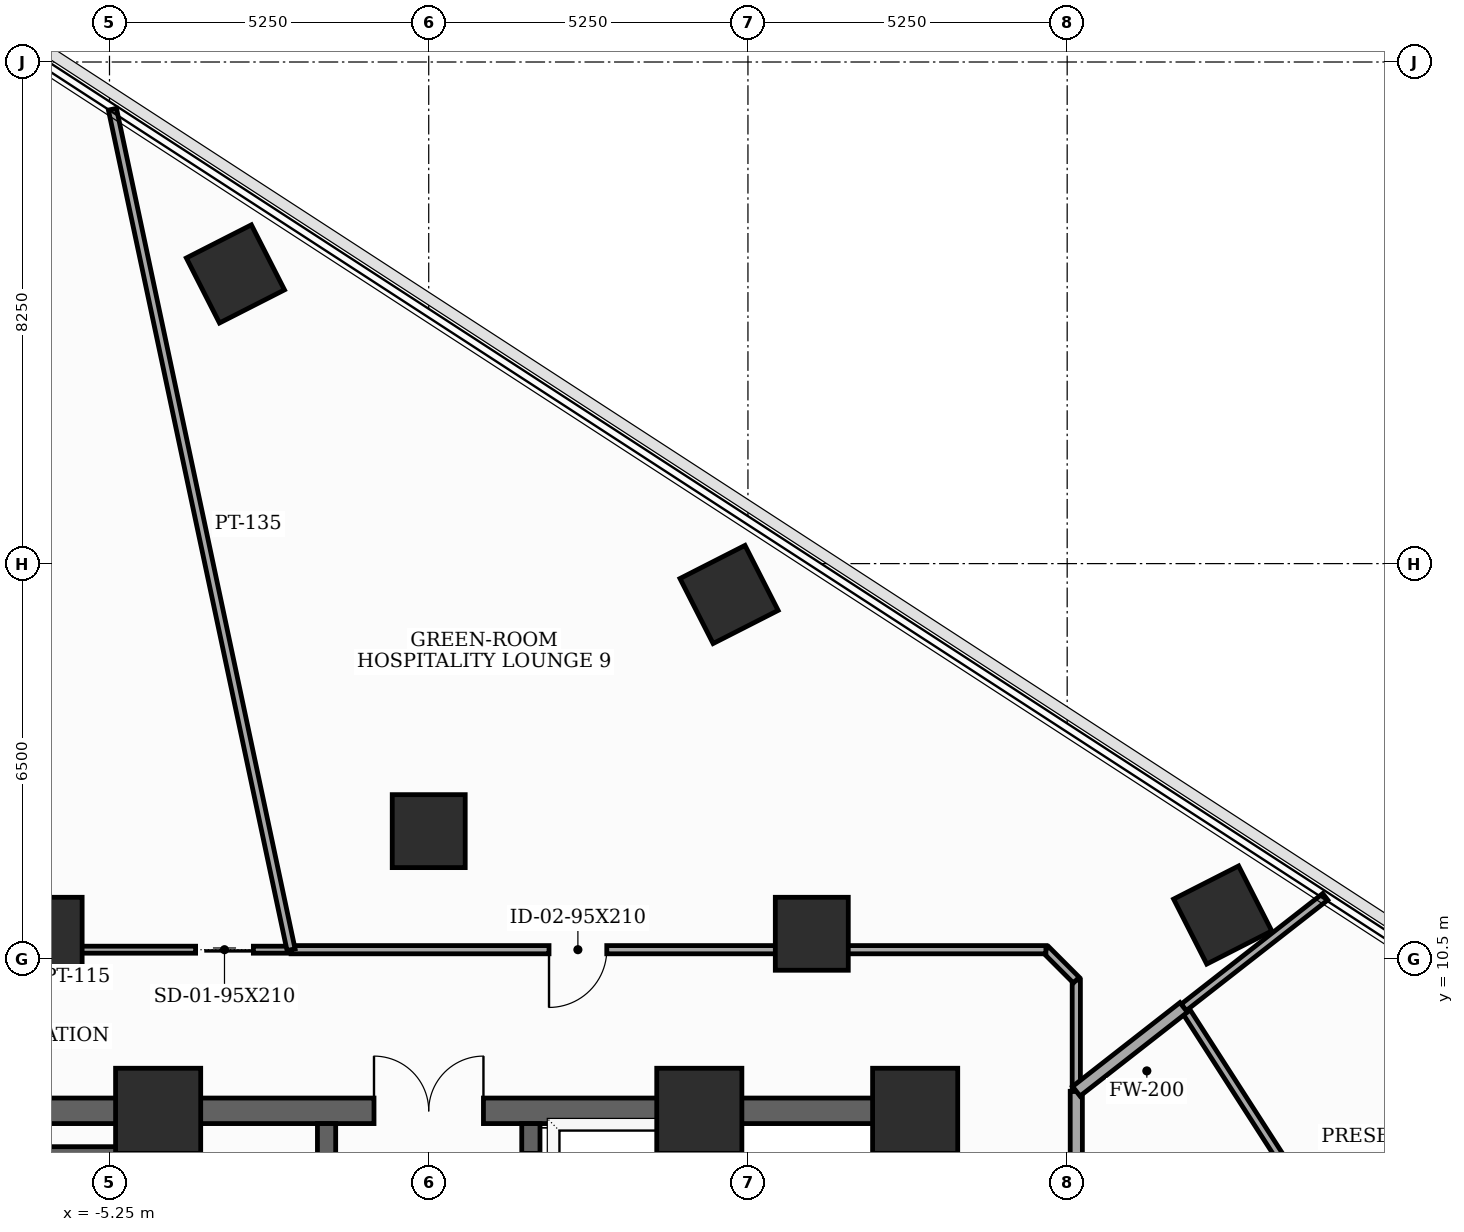
"""IFC4 building model, lengths in metres.
Left out: names, types, materials, properties, quantities, classifications, styles, units other than length and angle.
Written with IfcOpenShell. Run it as: python <this file> out.ifc"""

import sys

from ifc_helpers import new_model, si_unit, direction, frame, frame_2d, origin, origin_2d, place, context, subcontext, project, spatial, rectangle, extrude, element, fill, save


model = new_model("IFC4")
c1 = context("Model", 3, precision=1e-05, world=origin(), true_north=direction((0.0, 1.0)))
c2 = subcontext(c1, "Body", "Model", "MODEL_VIEW")
j1 = project(units=[si_unit("LENGTHUNIT", "METRE"), si_unit("PLANEANGLEUNIT", "RADIAN")], contexts=[c1])
p1 = place(None, origin())
s1 = spatial("IfcSite", under=j1, at=p1, CompositionType="ELEMENT")
p2 = place(p1, origin())
s2 = spatial("IfcBuilding", under=s1, at=p2, CompositionType="ELEMENT")
p3 = place(p2, frame((0.0, 0.0, 119.9)))
s3 = spatial("IfcBuildingStorey", under=s2, at=p3, CompositionType="ELEMENT", Elevation=119.9)
for number, where, z_axis, x_axis in (
    (1, (8.0, 8.0, 0.0), (0.0, 0.0, 1.0), (1.0, 0.0, 0.0)),
    (2, (4.45, 8.0, 0.0), (0.0, 0.0, 1.0), (1.0, 0.0, 0.0)),
    (3, (-4.45, 8.0, 0.0), (0.0, 0.0, 1.0), (1.0, 0.0, 0.0)),
):
    element("IfcColumn", number, at=place(p3, frame(where, z_axis=z_axis, x_axis=x_axis)), inside=s3, PredefinedType="COLUMN", context=c2, shape_type="SweptSolid", body=[
        extrude(rectangle(XDim=1.4, YDim=1.4, at=origin_2d()), origin(), (0.0, 0.0, 1.0), 3.7),
    ])
for number, where, z_axis, x_axis in (
    (4, (6.3, 10.912, 0.0), (0.0, 0.0, 1.0), (1.0, 0.0, 0.0)),
    (5, (0.0, 12.6, 0.0), (0.0, 0.0, 1.0), (1.0, 0.0, 0.0)),
    (6, (-6.3, 10.912, 0.0), (0.0, 0.0, 1.0), (1.0, 0.0, 0.0)),
    (7, (13.058, 11.22, 0.0), (0.0, 0.0, 1.0), (0.891, 0.454, 0.0)),
    (8, (4.939, 16.492, 0.0), (0.0, 0.0, 1.0), (0.891, 0.454, 0.0)),
    (9, (-3.179, 21.765, 0.0), (0.0, 0.0, 1.0), (0.891, 0.454, 0.0)),
):
    element("IfcColumn", number, at=place(p3, frame(where, z_axis=z_axis, x_axis=x_axis)), inside=s3, PredefinedType="COLUMN", context=c2, shape_type="SweptSolid", body=[
        extrude(rectangle(XDim=1.2, YDim=1.2, at=origin_2d()), origin(), (0.0, 0.0, 1.0), 3.7),
    ])
p4 = place(p3, frame((8.0, -8.0, 0.0), z_axis=(0.0, 0.0, 1.0), x_axis=(0.0, 1.0, 0.0)))
e10 = element("IfcWall", 10, at=p4, inside=s3, PredefinedType="SHEAR", context=c2, shape_type="SweptSolid", body=[
    extrude(rectangle(XDim=16.0, YDim=0.42, at=frame_2d((8.0, 0.0))), origin(), (0.0, 0.0, 1.0), 3.5),
])
p5 = place(p4, frame((9.6, 0.0, 0.0)))
e11 = element("IfcOpeningElement", 11, at=p5, cuts=e10, PredefinedType="OPENING", context=c2, shape_type="SweptSolid", body=[
    extrude(rectangle(XDim=1.05, YDim=2.15, at=frame_2d((0.525, 1.075))), frame((0.0, 0.22, 0.0), z_axis=(0.0, -1.0, 0.0), x_axis=(1.0, 0.0, 0.0)), (0.0, 0.0, 1.0), 0.44),
])
p6 = place(p4, frame((14.229, 0.0, 0.0)))
e12 = element("IfcOpeningElement", 12, at=p6, cuts=e10, PredefinedType="OPENING", context=c2, shape_type="SweptSolid", body=[
    extrude(rectangle(XDim=0.85, YDim=2.02, at=frame_2d((0.425, 1.01))), frame((0.0, 0.22, 0.0), z_axis=(0.0, -1.0, 0.0), x_axis=(1.0, 0.0, 0.0)), (0.0, 0.0, 1.0), 0.44),
])
p7 = place(p3, frame((-8.0, 8.0, 0.0), z_axis=(0.0, 0.0, 1.0), x_axis=(1.0, 0.0, 0.0)))
e13 = element("IfcWall", 13, at=p7, inside=s3, PredefinedType="SHEAR", context=c2, shape_type="SweptSolid", body=[
    extrude(rectangle(XDim=16.0, YDim=0.42, at=frame_2d((8.0, 0.0))), origin(), (0.0, 0.0, 1.0), 3.5),
])
p8 = place(p7, frame((7.1, 0.0, 0.0)))
e14 = element("IfcOpeningElement", 14, at=p8, cuts=e13, PredefinedType="OPENING", context=c2, shape_type="SweptSolid", body=[
    extrude(rectangle(XDim=1.8, YDim=2.15, at=frame_2d((0.9, 1.075))), frame((0.0, 0.22, 0.0), z_axis=(0.0, -1.0, 0.0), x_axis=(1.0, 0.0, 0.0)), (0.0, 0.0, 1.0), 0.44),
])
for number, where, z_axis, x_axis in (
    (15, (-4.45, -7.79, 0.0), (0.0, 0.0, 1.0), (0.0, 1.0, 0.0)),
    (16, (4.45, -7.79, 0.0), (0.0, 0.0, 1.0), (0.0, 1.0, 0.0)),
):
    element("IfcWall", number, at=place(p3, frame(where, z_axis=z_axis, x_axis=x_axis)), inside=s3, PredefinedType="SHEAR", context=c2, shape_type="SweptSolid", body=[
        extrude(rectangle(XDim=15.58, YDim=0.3, at=frame_2d((7.79, 0.0))), origin(), (0.0, 0.0, 1.0), 3.5),
    ])
p9 = place(p3, frame((-7.79, 7.26, 0.0), z_axis=(0.0, 0.0, 1.0), x_axis=(1.0, 0.0, 0.0)))
e17 = element("IfcWall", 17, at=p9, inside=s3, PredefinedType="SHEAR", context=c2, shape_type="SweptSolid", body=[
    extrude(rectangle(XDim=3.34, YDim=0.3, at=frame_2d((1.67, 0.0))), origin(), (0.0, 0.0, 1.0), 3.5),
])
p10 = place(p3, frame((-1.68, -4.85, 0.0), z_axis=(0.0, 0.0, 1.0), x_axis=(0.0, 1.0, 0.0)))
e18 = element("IfcWall", 18, at=p10, inside=s3, PredefinedType="SHEAR", context=c2, shape_type="SweptSolid", body=[
    extrude(rectangle(XDim=12.64, YDim=0.3, at=frame_2d((6.32, 0.0))), origin(), (0.0, 0.0, 1.0), 3.5),
])
p11 = place(p10, frame((5.5, 0.0, 0.0)))
e19 = element("IfcOpeningElement", 19, at=p11, cuts=e18, PredefinedType="OPENING", context=c2, shape_type="SweptSolid", body=[
    extrude(rectangle(XDim=0.95, YDim=2.1, at=frame_2d((0.475, 1.05))), frame((0.0, 0.16, 0.0), z_axis=(0.0, -1.0, 0.0), x_axis=(1.0, 0.0, 0.0)), (0.0, 0.0, 1.0), 0.32),
])
p12 = place(p3, frame((1.68, -4.85, 0.0), z_axis=(0.0, 0.0, 1.0), x_axis=(0.0, 1.0, 0.0)))
e20 = element("IfcWall", 20, at=p12, inside=s3, PredefinedType="SHEAR", context=c2, shape_type="SweptSolid", body=[
    extrude(rectangle(XDim=12.64, YDim=0.3, at=frame_2d((6.32, 0.0))), origin(), (0.0, 0.0, 1.0), 3.5),
])
p13 = place(p12, frame((0.55, 0.0, 0.0)))
e21 = element("IfcOpeningElement", 21, at=p13, cuts=e20, PredefinedType="OPENING", context=c2, shape_type="SweptSolid", body=[
    extrude(rectangle(XDim=1.1, YDim=2.1, at=frame_2d((0.55, 1.05))), frame((0.0, 0.16, 0.0), z_axis=(0.0, -1.0, 0.0), x_axis=(1.0, 0.0, 0.0)), (0.0, 0.0, 1.0), 0.32),
])
p14 = place(p12, frame((2.65, 0.0, 0.0)))
e22 = element("IfcOpeningElement", 22, at=p14, cuts=e20, PredefinedType="OPENING", context=c2, shape_type="SweptSolid", body=[
    extrude(rectangle(XDim=1.1, YDim=2.1, at=frame_2d((0.55, 1.05))), frame((0.0, 0.16, 0.0), z_axis=(0.0, -1.0, 0.0), x_axis=(1.0, 0.0, 0.0)), (0.0, 0.0, 1.0), 0.32),
])
p15 = place(p12, frame((4.75, 0.0, 0.0)))
e23 = element("IfcOpeningElement", 23, at=p15, cuts=e20, PredefinedType="OPENING", context=c2, shape_type="SweptSolid", body=[
    extrude(rectangle(XDim=1.1, YDim=2.1, at=frame_2d((0.55, 1.05))), frame((0.0, 0.16, 0.0), z_axis=(0.0, -1.0, 0.0), x_axis=(1.0, 0.0, 0.0)), (0.0, 0.0, 1.0), 0.32),
])
p16 = place(p12, frame((6.85, 0.0, 0.0)))
e24 = element("IfcOpeningElement", 24, at=p16, cuts=e20, PredefinedType="OPENING", context=c2, shape_type="SweptSolid", body=[
    extrude(rectangle(XDim=1.1, YDim=2.1, at=frame_2d((0.55, 1.05))), frame((0.0, 0.16, 0.0), z_axis=(0.0, -1.0, 0.0), x_axis=(1.0, 0.0, 0.0)), (0.0, 0.0, 1.0), 0.32),
])
p17 = place(p12, frame((8.95, 0.0, 0.0)))
e25 = element("IfcOpeningElement", 25, at=p17, cuts=e20, PredefinedType="OPENING", context=c2, shape_type="SweptSolid", body=[
    extrude(rectangle(XDim=1.1, YDim=2.1, at=frame_2d((0.55, 1.05))), frame((0.0, 0.16, 0.0), z_axis=(0.0, -1.0, 0.0), x_axis=(1.0, 0.0, 0.0)), (0.0, 0.0, 1.0), 0.32),
])
p18 = place(p12, frame((11.05, 0.0, 0.0)))
e26 = element("IfcOpeningElement", 26, at=p18, cuts=e20, PredefinedType="OPENING", context=c2, shape_type="SweptSolid", body=[
    extrude(rectangle(XDim=1.1, YDim=2.1, at=frame_2d((0.55, 1.05))), frame((0.0, 0.16, 0.0), z_axis=(0.0, -1.0, 0.0), x_axis=(1.0, 0.0, 0.0)), (0.0, 0.0, 1.0), 0.32),
])
p19 = place(p3, frame((10.65, 2.655, 0.0), z_axis=(0.0, 0.0, 1.0), x_axis=(0.0, 1.0, 0.0)))
e27 = element("IfcWall", 27, at=p19, inside=s3, PredefinedType="SOLIDWALL", context=c2, shape_type="SweptSolid", body=[
    extrude(rectangle(XDim=5.666, YDim=0.2, at=frame_2d((2.833, 0.0))), origin(), (0.0, 0.0, 1.0), 2.785),
])
p20 = place(p19, frame((0.673, 0.0, 0.0)))
e28 = element("IfcOpeningElement", 28, at=p20, cuts=e27, PredefinedType="OPENING", context=c2, shape_type="SweptSolid", body=[
    extrude(rectangle(XDim=0.92, YDim=2.1, at=frame_2d((0.46, 1.05))), frame((0.0, 0.11, 0.0), z_axis=(0.0, -1.0, 0.0), x_axis=(1.0, 0.0, 0.0)), (0.0, 0.0, 1.0), 0.22),
])
p21 = place(p3, frame((10.65, 8.321, 0.0), z_axis=(0.0, 0.0, 1.0), x_axis=(0.0, 1.0, 0.0)))
e29 = element("IfcWall", 29, at=p21, inside=s3, PredefinedType="PARTITIONING", context=c2, shape_type="SweptSolid", body=[
    extrude(rectangle(XDim=1.829, YDim=0.135, at=frame_2d((0.915, 0.0))), origin(), (0.0, 0.0, 1.0), 3.125),
])
p22 = place(p3, frame((10.65, 10.15, 0.0), z_axis=(0.0, 0.0, 1.0), x_axis=(-0.707106781187, 0.707106781187, 0.0)))
e30 = element("IfcWall", 30, at=p22, inside=s3, PredefinedType="PARTITIONING", context=c2, shape_type="SweptSolid", body=[
    extrude(rectangle(XDim=0.707, YDim=0.135, at=frame_2d((0.354, 0.0))), origin(), (0.0, 0.0, 1.0), 3.125),
])
p23 = place(p3, frame((10.15, 10.65, 0.0), z_axis=(0.0, 0.0, 1.0), x_axis=(-1.0, 0.0, 0.0)))
e31 = element("IfcWall", 31, at=p23, inside=s3, PredefinedType="PARTITIONING", context=c2, shape_type="SweptSolid", body=[
    extrude(rectangle(XDim=12.414, YDim=0.135, at=frame_2d((6.207, 0.0))), origin(), (0.0, 0.0, 1.0), 2.785),
])
p24 = place(p23, frame((7.222, 0.0, 0.0)))
e32 = element("IfcOpeningElement", 32, at=p24, cuts=e31, PredefinedType="OPENING", context=c2, shape_type="SweptSolid", body=[
    extrude(rectangle(XDim=0.95, YDim=2.1, at=frame_2d((0.475, 1.05))), frame((0.0, 0.077, 0.0), z_axis=(0.0, -1.0, 0.0), x_axis=(1.0, 0.0, 0.0)), (0.0, 0.0, 1.0), 0.155),
])
p25 = place(p3, frame((-2.264, 10.65, 0.0), z_axis=(0.0, 0.0, 1.0), x_axis=(-1.0, 0.0, 0.0)))
e33 = element("IfcWall", 33, at=p25, inside=s3, PredefinedType="PARTITIONING", context=c2, shape_type="SweptSolid", body=[
    extrude(rectangle(XDim=5.474, YDim=0.115, at=frame_2d((2.737, 0.0))), origin(), (0.0, 0.0, 1.0), 2.785),
])
p26 = place(p25, frame((0.62, 0.0, 0.0)))
e34 = element("IfcOpeningElement", 34, at=p26, cuts=e33, PredefinedType="OPENING", context=c2, shape_type="SweptSolid", body=[
    extrude(rectangle(XDim=0.95, YDim=2.1, at=frame_2d((0.475, 1.05))), frame((0.0, 0.067, 0.0), z_axis=(0.0, -1.0, 0.0), x_axis=(1.0, 0.0, 0.0)), (0.0, 0.0, 1.0), 0.135),
])
p27 = place(p3, frame((12.416, 9.701, 0.0), z_axis=(0.0, 0.0, 1.0), x_axis=(0.540981963117, -0.841034194062, 0.0)))
e35 = element("IfcWall", 35, at=p27, inside=s3, PredefinedType="PARTITIONING", context=c2, shape_type="SweptSolid", body=[
    extrude(rectangle(XDim=3.299, YDim=0.135, at=frame_2d((1.65, 0.0))), origin(), (0.0, 0.0, 1.0), 2.885),
])
p28 = place(p3, frame((14.744, 11.52, 0.0), z_axis=(0.0, 0.0, 1.0), x_axis=(-0.788015604839, -0.615655265981, 0.0)))
e36 = element("IfcWall", 36, at=p28, inside=s3, PredefinedType="PARTITIONING", context=c2, shape_type="SweptSolid", body=[
    extrude(rectangle(XDim=2.955, YDim=0.135, at=frame_2d((1.478, 0.0))), origin(), (0.0, 0.0, 1.0), 2.885),
])
p29 = place(p3, frame((12.416, 9.701, 0.0), z_axis=(0.0, 0.0, 1.0), x_axis=(-0.788001252745, -0.615673635681, 0.0)))
e37 = element("IfcWall", 37, at=p29, inside=s3, PredefinedType="SOLIDWALL", context=c2, shape_type="SweptSolid", body=[
    extrude(rectangle(XDim=2.241, YDim=0.2, at=frame_2d((1.121, 0.0))), origin(), (0.0, 0.0, 1.0), 2.885),
])
p30 = place(p3, frame((-5.202, 24.473, 0.0), z_axis=(0.0, 0.0, 1.0), x_axis=(0.207879417489, -0.978154460085, 0.0)))
e38 = element("IfcWall", 38, at=p30, inside=s3, PredefinedType="PARTITIONING", context=c2, shape_type="SweptSolid", body=[
    extrude(rectangle(XDim=14.132, YDim=0.135, at=frame_2d((7.066, 0.0))), origin(), (0.0, 0.0, 1.0), 2.785),
])
p31 = place(p8, origin())
e39 = element("IfcDoor", 39, at=p31, inside=s3, OperationType="DOUBLE_DOOR_SINGLE_SWING", PredefinedType="DOOR", context=c2, shape_type="SweptSolid", body=[
    extrude(rectangle(XDim=1.8, YDim=2.15, at=frame_2d((0.9, 1.075))), frame((0.0, 0.025, 0.0), z_axis=(0.0, -1.0, 0.0), x_axis=(1.0, 0.0, 0.0)), (0.0, 0.0, 1.0), 0.05),
])
fill(e14, e39)
p32 = place(p24, origin())
e40 = element("IfcDoor", 40, at=p32, inside=s3, OperationType="SINGLE_SWING_RIGHT", PredefinedType="DOOR", context=c2, shape_type="SweptSolid", body=[
    extrude(rectangle(XDim=0.95, YDim=2.1, at=frame_2d((0.475, 1.05))), frame((0.0, 0.025, 0.0), z_axis=(0.0, -1.0, 0.0), x_axis=(1.0, 0.0, 0.0)), (0.0, 0.0, 1.0), 0.05),
])
fill(e32, e40)
p33 = place(p26, origin())
e41 = element("IfcDoor", 41, at=p33, inside=s3, OperationType="SLIDING_TO_LEFT", PredefinedType="DOOR", context=c2, shape_type="SweptSolid", body=[
    extrude(rectangle(XDim=0.95, YDim=2.1, at=frame_2d((0.475, 1.05))), frame((0.0, 0.025, 0.0), z_axis=(0.0, -1.0, 0.0), x_axis=(1.0, 0.0, 0.0)), (0.0, 0.0, 1.0), 0.05),
])
fill(e34, e41)
save(model, sys.argv[1])
